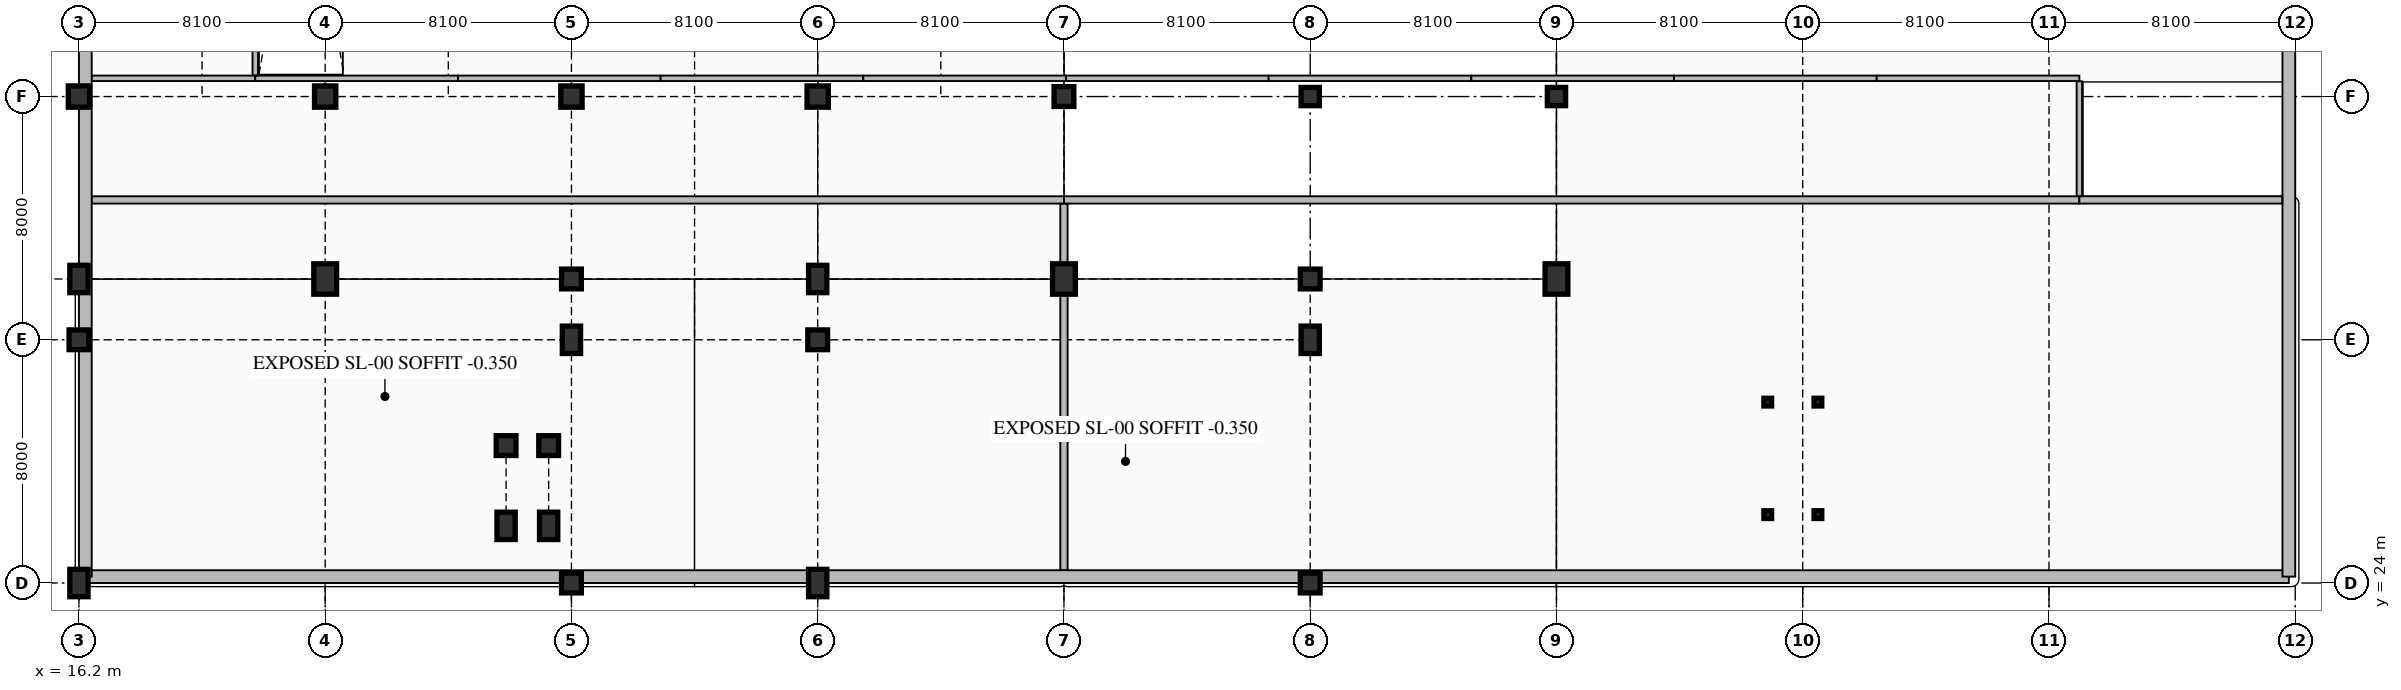
"""IFC4 building model, lengths in metres.
Left out: names, types, materials, properties, quantities, classifications, styles, units other than length and angle.
Written with IfcOpenShell. Run it as: python <this file> out.ifc"""

import sys

from ifc_helpers import new_model, si_unit, direction, frame, frame_2d, origin, origin_2d, place, context, subcontext, project, spatial, rectangle, hollow_rectangle, extrude, element, fill, save


model = new_model("IFC4")
c1 = context("Model", 3, precision=1e-05, world=origin(), true_north=direction((0.0, 1.0)))
c2 = subcontext(c1, "Body", "Model", "MODEL_VIEW")
j1 = project(units=[si_unit("LENGTHUNIT", "METRE"), si_unit("PLANEANGLEUNIT", "RADIAN")], contexts=[c1])
p1 = place(None, origin())
s1 = spatial("IfcSite", under=j1, at=p1, CompositionType="ELEMENT")
p2 = place(p1, origin())
s2 = spatial("IfcBuilding", under=s1, at=p2, CompositionType="ELEMENT")
p3 = place(p2, frame((0.0, 0.0, -4.8)))
s3 = spatial("IfcBuildingStorey", under=s2, at=p3, CompositionType="ELEMENT", Elevation=-4.8)
p4 = place(p3, frame((88.89, 24.21, 0.0), z_axis=(0.0, 0.0, 1.0), x_axis=(-1.0, 0.0, 0.0)))
e1 = element("IfcWall", 1, at=p4, inside=s3, PredefinedType="USERDEFINED", context=c2, shape_type="SweptSolid", body=[
    extrude(rectangle(XDim=72.48, YDim=0.42, at=frame_2d((36.24, 0.0))), origin(), (0.0, 0.0, 1.0), 4.45),
])
p5 = place(p3, frame((16.41, 24.21, 0.0), z_axis=(0.0, 0.0, 1.0), x_axis=(0.0, 1.0, 0.0)))
e2 = element("IfcWall", 2, at=p5, inside=s3, PredefinedType="USERDEFINED", context=c2, shape_type="SweptSolid", body=[
    extrude(rectangle(XDim=87.58, YDim=0.42, at=frame_2d((43.79, 0.0))), origin(), (0.0, 0.0, 1.0), 4.45),
])
p6 = place(p3, frame((88.89, 56.0, 0.0), z_axis=(0.0, 0.0, 1.0), x_axis=(0.0, -1.0, 0.0)))
e3 = element("IfcWall", 3, at=p6, inside=s3, PredefinedType="USERDEFINED", context=c2, shape_type="SweptSolid", body=[
    extrude(rectangle(XDim=31.79, YDim=0.42, at=frame_2d((15.895, 0.0))), origin(), (0.0, 0.0, 1.0), 4.45),
])
p7 = place(p3, frame((16.2, 24.0, 0.0), z_axis=(0.0, 0.0, 1.0), x_axis=(1.0, 0.0, 0.0)))
e4 = element("IfcColumn", 4, at=p7, inside=s3, PredefinedType="COLUMN", context=c2, shape_type="SweptSolid", body=[
    extrude(rectangle(XDim=0.6, YDim=0.9, at=origin_2d()), origin(), (0.0, 0.0, 1.0), 4.8),
])
p8 = place(p3, frame((16.2, 32.0, 0.0), z_axis=(0.0, 0.0, 1.0), x_axis=(1.0, 0.0, 0.0)))
e5 = element("IfcColumn", 5, at=p8, inside=s3, PredefinedType="COLUMN", context=c2, shape_type="SweptSolid", body=[
    extrude(rectangle(XDim=0.65, YDim=0.65, at=origin_2d()), origin(), (0.0, 0.0, 1.0), 4.8),
])
p9 = place(p3, frame((16.2, 34.0, 0.0), z_axis=(0.0, 0.0, 1.0), x_axis=(1.0, 0.0, 0.0)))
e6 = element("IfcColumn", 6, at=p9, inside=s3, PredefinedType="COLUMN", context=c2, shape_type="SweptSolid", body=[
    extrude(rectangle(XDim=0.6, YDim=0.9, at=origin_2d()), origin(), (0.0, 0.0, 1.0), 4.8),
])
p10 = place(p3, frame((16.2, 40.0, 0.0), z_axis=(0.0, 0.0, 1.0), x_axis=(1.0, 0.0, 0.0)))
e7 = element("IfcColumn", 7, at=p10, inside=s3, PredefinedType="COLUMN", context=c2, shape_type="SweptSolid", body=[
    extrude(rectangle(XDim=0.7, YDim=0.7, at=origin_2d()), origin(), (0.0, 0.0, 1.0), 4.8),
])
p11 = place(p3, frame((24.3, 34.0, 0.0), z_axis=(0.0, 0.0, 1.0), x_axis=(1.0, 0.0, 0.0)))
e8 = element("IfcColumn", 8, at=p11, inside=s3, PredefinedType="COLUMN", context=c2, shape_type="SweptSolid", body=[
    extrude(rectangle(XDim=0.75, YDim=1.0, at=origin_2d()), origin(), (0.0, 0.0, 1.0), 4.8),
])
p12 = place(p3, frame((24.3, 40.0, 0.0), z_axis=(0.0, 0.0, 1.0), x_axis=(1.0, 0.0, 0.0)))
e9 = element("IfcColumn", 9, at=p12, inside=s3, PredefinedType="COLUMN", context=c2, shape_type="SweptSolid", body=[
    extrude(rectangle(XDim=0.7, YDim=0.7, at=origin_2d()), origin(), (0.0, 0.0, 1.0), 4.8),
])
p13 = place(p3, frame((30.25, 25.88, 0.0), z_axis=(0.0, 0.0, 1.0), x_axis=(1.0, 0.0, 0.0)))
e10 = element("IfcColumn", 10, at=p13, inside=s3, PredefinedType="COLUMN", context=c2, shape_type="SweptSolid", body=[
    extrude(rectangle(XDim=0.6, YDim=0.9, at=origin_2d()), origin(), (0.0, 0.0, 1.0), 4.8),
])
p14 = place(p3, frame((30.25, 28.52, 0.0), z_axis=(0.0, 0.0, 1.0), x_axis=(1.0, 0.0, 0.0)))
e11 = element("IfcColumn", 11, at=p14, inside=s3, PredefinedType="COLUMN", context=c2, shape_type="SweptSolid", body=[
    extrude(rectangle(XDim=0.65, YDim=0.65, at=origin_2d()), origin(), (0.0, 0.0, 1.0), 4.8),
])
p15 = place(p3, frame((31.65, 25.88, 0.0), z_axis=(0.0, 0.0, 1.0), x_axis=(1.0, 0.0, 0.0)))
e12 = element("IfcColumn", 12, at=p15, inside=s3, PredefinedType="COLUMN", context=c2, shape_type="SweptSolid", body=[
    extrude(rectangle(XDim=0.6, YDim=0.9, at=origin_2d()), origin(), (0.0, 0.0, 1.0), 4.8),
])
for number, where, z_axis, x_axis in (
    (13, (31.65, 28.52, 0.0), (0.0, 0.0, 1.0), (1.0, 0.0, 0.0)),
    (14, (32.4, 24.0, 0.0), (0.0, 0.0, 1.0), (1.0, 0.0, 0.0)),
):
    element("IfcColumn", number, at=place(p3, frame(where, z_axis=z_axis, x_axis=x_axis)), inside=s3, PredefinedType="COLUMN", context=c2, shape_type="SweptSolid", body=[
        extrude(rectangle(XDim=0.65, YDim=0.65, at=origin_2d()), origin(), (0.0, 0.0, 1.0), 4.8),
    ])
p16 = place(p3, frame((32.4, 32.0, 0.0), z_axis=(0.0, 0.0, 1.0), x_axis=(1.0, 0.0, 0.0)))
e15 = element("IfcColumn", 15, at=p16, inside=s3, PredefinedType="COLUMN", context=c2, shape_type="SweptSolid", body=[
    extrude(rectangle(XDim=0.6, YDim=0.9, at=origin_2d()), origin(), (0.0, 0.0, 1.0), 4.8),
])
p17 = place(p3, frame((32.4, 34.0, 0.0), z_axis=(0.0, 0.0, 1.0), x_axis=(1.0, 0.0, 0.0)))
e16 = element("IfcColumn", 16, at=p17, inside=s3, PredefinedType="COLUMN", context=c2, shape_type="SweptSolid", body=[
    extrude(rectangle(XDim=0.65, YDim=0.65, at=origin_2d()), origin(), (0.0, 0.0, 1.0), 4.8),
])
p18 = place(p3, frame((32.4, 40.0, 0.0), z_axis=(0.0, 0.0, 1.0), x_axis=(1.0, 0.0, 0.0)))
e17 = element("IfcColumn", 17, at=p18, inside=s3, PredefinedType="COLUMN", context=c2, shape_type="SweptSolid", body=[
    extrude(rectangle(XDim=0.7, YDim=0.7, at=origin_2d()), origin(), (0.0, 0.0, 1.0), 4.8),
])
p19 = place(p3, frame((40.5, 24.0, 0.0), z_axis=(0.0, 0.0, 1.0), x_axis=(1.0, 0.0, 0.0)))
e18 = element("IfcColumn", 18, at=p19, inside=s3, PredefinedType="COLUMN", context=c2, shape_type="SweptSolid", body=[
    extrude(rectangle(XDim=0.6, YDim=0.9, at=origin_2d()), origin(), (0.0, 0.0, 1.0), 4.8),
])
p20 = place(p3, frame((40.5, 32.0, 0.0), z_axis=(0.0, 0.0, 1.0), x_axis=(1.0, 0.0, 0.0)))
e19 = element("IfcColumn", 19, at=p20, inside=s3, PredefinedType="COLUMN", context=c2, shape_type="SweptSolid", body=[
    extrude(rectangle(XDim=0.65, YDim=0.65, at=origin_2d()), origin(), (0.0, 0.0, 1.0), 4.8),
])
p21 = place(p3, frame((40.5, 34.0, 0.0), z_axis=(0.0, 0.0, 1.0), x_axis=(1.0, 0.0, 0.0)))
e20 = element("IfcColumn", 20, at=p21, inside=s3, PredefinedType="COLUMN", context=c2, shape_type="SweptSolid", body=[
    extrude(rectangle(XDim=0.6, YDim=0.9, at=origin_2d()), origin(), (0.0, 0.0, 1.0), 4.8),
])
p22 = place(p3, frame((40.5, 40.0, 0.0), z_axis=(0.0, 0.0, 1.0), x_axis=(1.0, 0.0, 0.0)))
e21 = element("IfcColumn", 21, at=p22, inside=s3, PredefinedType="COLUMN", context=c2, shape_type="SweptSolid", body=[
    extrude(rectangle(XDim=0.7, YDim=0.7, at=origin_2d()), origin(), (0.0, 0.0, 1.0), 4.8),
])
p23 = place(p3, frame((48.6, 34.0, 0.0), z_axis=(0.0, 0.0, 1.0), x_axis=(1.0, 0.0, 0.0)))
e22 = element("IfcColumn", 22, at=p23, inside=s3, PredefinedType="COLUMN", context=c2, shape_type="SweptSolid", body=[
    extrude(rectangle(XDim=0.75, YDim=1.0, at=origin_2d()), origin(), (0.0, 0.0, 1.0), 4.8),
])
for number, where, z_axis, x_axis in (
    (23, (48.6, 40.0, 0.0), (0.0, 0.0, 1.0), (1.0, 0.0, 0.0)),
    (24, (56.7, 24.0, 0.0), (0.0, 0.0, 1.0), (1.0, 0.0, 0.0)),
):
    element("IfcColumn", number, at=place(p3, frame(where, z_axis=z_axis, x_axis=x_axis)), inside=s3, PredefinedType="COLUMN", context=c2, shape_type="SweptSolid", body=[
        extrude(rectangle(XDim=0.65, YDim=0.65, at=origin_2d()), origin(), (0.0, 0.0, 1.0), 4.8),
    ])
p24 = place(p3, frame((56.7, 32.0, 0.0), z_axis=(0.0, 0.0, 1.0), x_axis=(1.0, 0.0, 0.0)))
e25 = element("IfcColumn", 25, at=p24, inside=s3, PredefinedType="COLUMN", context=c2, shape_type="SweptSolid", body=[
    extrude(rectangle(XDim=0.6, YDim=0.9, at=origin_2d()), origin(), (0.0, 0.0, 1.0), 4.8),
])
p25 = place(p3, frame((56.7, 34.0, 0.0), z_axis=(0.0, 0.0, 1.0), x_axis=(1.0, 0.0, 0.0)))
e26 = element("IfcColumn", 26, at=p25, inside=s3, PredefinedType="COLUMN", context=c2, shape_type="SweptSolid", body=[
    extrude(rectangle(XDim=0.65, YDim=0.65, at=origin_2d()), origin(), (0.0, 0.0, 1.0), 4.8),
])
p26 = place(p3, frame((56.7, 40.0, 0.0), z_axis=(0.0, 0.0, 1.0), x_axis=(1.0, 0.0, 0.0)))
e27 = element("IfcColumn", 27, at=p26, inside=s3, PredefinedType="COLUMN", context=c2, shape_type="SweptSolid", body=[
    extrude(rectangle(XDim=0.6, YDim=0.6, at=origin_2d()), origin(), (0.0, 0.0, 1.0), 4.45),
])
p27 = place(p3, frame((64.8, 34.0, 0.0), z_axis=(0.0, 0.0, 1.0), x_axis=(1.0, 0.0, 0.0)))
e28 = element("IfcColumn", 28, at=p27, inside=s3, PredefinedType="COLUMN", context=c2, shape_type="SweptSolid", body=[
    extrude(rectangle(XDim=0.75, YDim=1.0, at=origin_2d()), origin(), (0.0, 0.0, 1.0), 4.8),
])
p28 = place(p3, frame((64.8, 40.0, 0.0), z_axis=(0.0, 0.0, 1.0), x_axis=(1.0, 0.0, 0.0)))
e29 = element("IfcColumn", 29, at=p28, inside=s3, PredefinedType="COLUMN", context=c2, shape_type="SweptSolid", body=[
    extrude(rectangle(XDim=0.6, YDim=0.6, at=origin_2d()), origin(), (0.0, 0.0, 1.0), 4.8),
])
for number, where, z_axis, x_axis in (
    (30, (73.4, 26.25, 0.0), (0.0, 0.0, 1.0), (1.0, 0.0, 0.0)),
    (31, (73.4, 29.95, 0.0), (0.0, 0.0, 1.0), (1.0, 0.0, 0.0)),
    (32, (71.75, 26.25, 0.0), (0.0, 0.0, 1.0), (1.0, 0.0, 0.0)),
    (33, (71.75, 29.95, 0.0), (0.0, 0.0, 1.0), (1.0, 0.0, 0.0)),
):
    element("IfcColumn", number, at=place(p3, frame(where, z_axis=z_axis, x_axis=x_axis)), inside=s3, PredefinedType="COLUMN", context=c2, shape_type="SweptSolid", body=[
        extrude(hollow_rectangle(XDim=0.254, YDim=0.254, WallThickness=0.013, InnerFilletRadius=0.013, OuterFilletRadius=0.025, at=origin_2d()), origin(), (0.0, 0.0, 1.0), 4.8),
    ])
p29 = place(p3, frame((16.628, 36.6, 0.0), z_axis=(0.0, 0.0, 1.0), x_axis=(1.0, 0.0, 0.0)))
e34 = element("IfcWall", 34, at=p29, inside=s3, PredefinedType="PARTITIONING", context=c2, shape_type="SweptSolid", body=[
    extrude(rectangle(XDim=31.972, YDim=0.24, at=frame_2d((15.986, 0.0))), origin(), (0.0, 0.0, 1.0), 4.45),
])
p30 = place(p29, frame((15.286, 0.0, 0.0)))
e35 = element("IfcOpeningElement", 35, at=p30, cuts=e34, PredefinedType="OPENING", context=c2, shape_type="SweptSolid", body=[
    extrude(rectangle(XDim=1.4, YDim=2.35, at=frame_2d((0.7, 1.175))), frame((0.0, 0.13, 0.0), z_axis=(0.0, -1.0, 0.0), x_axis=(1.0, 0.0, 0.0)), (0.0, 0.0, 1.0), 0.26),
])
p31 = place(p3, frame((16.628, 40.6, 0.0), z_axis=(0.0, 0.0, 1.0), x_axis=(1.0, 0.0, 0.0)))
e36 = element("IfcWall", 36, at=p31, inside=s3, PredefinedType="PARTITIONING", context=c2, shape_type="SweptSolid", body=[
    extrude(rectangle(XDim=5.372, YDim=0.18, at=frame_2d((2.686, 0.0))), origin(), (0.0, 0.0, 1.0), 4.45),
])
p32 = place(p31, frame((2.136, 0.0, 0.0)))
e37 = element("IfcOpeningElement", 37, at=p32, cuts=e36, PredefinedType="OPENING", context=c2, shape_type="SweptSolid", body=[
    extrude(rectangle(XDim=1.1, YDim=2.2, at=frame_2d((0.55, 1.1))), frame((0.0, 0.1, 0.0), z_axis=(0.0, -1.0, 0.0), x_axis=(1.0, 0.0, 0.0)), (0.0, 0.0, 1.0), 0.2),
])
p33 = place(p3, frame((22.0, 40.6, 0.0), z_axis=(0.0, 0.0, 1.0), x_axis=(1.0, 0.0, 0.0)))
e38 = element("IfcWall", 38, at=p33, inside=s3, PredefinedType="PARTITIONING", context=c2, shape_type="SweptSolid", body=[
    extrude(rectangle(XDim=6.667, YDim=0.18, at=frame_2d((3.333, 0.0))), origin(), (0.0, 0.0, 1.0), 4.45),
])
p34 = place(p3, frame((28.667, 40.6, 0.0), z_axis=(0.0, 0.0, 1.0), x_axis=(1.0, 0.0, 0.0)))
e39 = element("IfcWall", 39, at=p34, inside=s3, PredefinedType="PARTITIONING", context=c2, shape_type="SweptSolid", body=[
    extrude(rectangle(XDim=6.667, YDim=0.18, at=frame_2d((3.333, 0.0))), origin(), (0.0, 0.0, 1.0), 4.45),
])
for number, where, z_axis, x_axis in (
    (40, (35.333, 40.6, 0.0), (0.0, 0.0, 1.0), (1.0, 0.0, 0.0)),
    (41, (42.0, 40.6, 0.0), (0.0, 0.0, 1.0), (1.0, 0.0, 0.0)),
):
    element("IfcWall", number, at=place(p3, frame(where, z_axis=z_axis, x_axis=x_axis)), inside=s3, PredefinedType="PARTITIONING", context=c2, shape_type="SweptSolid", body=[
        extrude(rectangle(XDim=6.667, YDim=0.18, at=frame_2d((3.333, 0.0))), origin(), (0.0, 0.0, 1.0), 4.45),
    ])
p35 = place(p3, frame((48.667, 40.6, 0.0), z_axis=(0.0, 0.0, 1.0), x_axis=(1.0, 0.0, 0.0)))
e42 = element("IfcWall", 42, at=p35, inside=s3, PredefinedType="PARTITIONING", context=c2, shape_type="SweptSolid", body=[
    extrude(rectangle(XDim=6.667, YDim=0.18, at=frame_2d((3.333, 0.0))), origin(), (0.0, 0.0, 1.0), 4.45),
])
for number, where, z_axis, x_axis in (
    (43, (55.333, 40.6, 0.0), (0.0, 0.0, 1.0), (1.0, 0.0, 0.0)),
    (44, (62.0, 40.6, 0.0), (0.0, 0.0, 1.0), (1.0, 0.0, 0.0)),
):
    element("IfcWall", number, at=place(p3, frame(where, z_axis=z_axis, x_axis=x_axis)), inside=s3, PredefinedType="PARTITIONING", context=c2, shape_type="SweptSolid", body=[
        extrude(rectangle(XDim=6.667, YDim=0.18, at=frame_2d((3.333, 0.0))), origin(), (0.0, 0.0, 1.0), 4.45),
    ])
p36 = place(p3, frame((68.667, 40.6, 0.0), z_axis=(0.0, 0.0, 1.0), x_axis=(1.0, 0.0, 0.0)))
e45 = element("IfcWall", 45, at=p36, inside=s3, PredefinedType="PARTITIONING", context=c2, shape_type="SweptSolid", body=[
    extrude(rectangle(XDim=6.667, YDim=0.18, at=frame_2d((3.333, 0.0))), origin(), (0.0, 0.0, 1.0), 4.45),
])
p37 = place(p3, frame((75.333, 40.6, 0.0), z_axis=(0.0, 0.0, 1.0), x_axis=(1.0, 0.0, 0.0)))
e46 = element("IfcWall", 46, at=p37, inside=s3, PredefinedType="PARTITIONING", context=c2, shape_type="SweptSolid", body=[
    extrude(rectangle(XDim=6.667, YDim=0.18, at=frame_2d((3.333, 0.0))), origin(), (0.0, 0.0, 1.0), 4.45),
])
p38 = place(p3, frame((48.6, 36.6, 0.0), z_axis=(0.0, 0.0, 1.0), x_axis=(1.0, 0.0, 0.0)))
e47 = element("IfcWall", 47, at=p38, inside=s3, PredefinedType="PARTITIONING", context=c2, shape_type="SweptSolid", body=[
    extrude(rectangle(XDim=33.4, YDim=0.24, at=frame_2d((16.7, 0.0))), origin(), (0.0, 0.0, 1.0), 4.45),
])
p39 = place(p38, frame((16.0, 0.0, 0.0)))
e48 = element("IfcOpeningElement", 48, at=p39, cuts=e47, PredefinedType="OPENING", context=c2, shape_type="SweptSolid", body=[
    extrude(rectangle(XDim=1.4, YDim=2.35, at=frame_2d((0.7, 1.175))), frame((0.0, 0.13, 0.0), z_axis=(0.0, -1.0, 0.0), x_axis=(1.0, 0.0, 0.0)), (0.0, 0.0, 1.0), 0.26),
])
p40 = place(p3, frame((82.0, 36.6, 0.0), z_axis=(0.0, 0.0, 1.0), x_axis=(1.0, 0.0, 0.0)))
e49 = element("IfcWall", 49, at=p40, inside=s3, PredefinedType="PARTITIONING", context=c2, shape_type="SweptSolid", body=[
    extrude(rectangle(XDim=6.672, YDim=0.24, at=frame_2d((3.336, 0.0))), origin(), (0.0, 0.0, 1.0), 4.45),
])
p41 = place(p3, frame((22.0, 40.698, 0.0), z_axis=(0.0, 0.0, 1.0), x_axis=(0.0, 1.0, 0.0)))
e50 = element("IfcWall", 50, at=p41, inside=s3, PredefinedType="PARTITIONING", context=c2, shape_type="SweptSolid", body=[
    extrude(rectangle(XDim=5.325, YDim=0.18, at=frame_2d((2.662, 0.0))), origin(), (0.0, 0.0, 1.0), 4.45),
])
p42 = place(p3, frame((48.6, 24.428, 0.0), z_axis=(0.0, 0.0, 1.0), x_axis=(0.0, 1.0, 0.0)))
e51 = element("IfcWall", 51, at=p42, inside=s3, PredefinedType="PARTITIONING", context=c2, shape_type="SweptSolid", body=[
    extrude(rectangle(XDim=9.064, YDim=0.24, at=frame_2d((4.532, 0.0))), origin(), (0.0, 0.0, 1.0), 3.242),
])
p43 = place(p3, frame((48.6, 34.508, 0.0), z_axis=(0.0, 0.0, 1.0), x_axis=(0.0, 1.0, 0.0)))
e52 = element("IfcWall", 52, at=p43, inside=s3, PredefinedType="PARTITIONING", context=c2, shape_type="SweptSolid", body=[
    extrude(rectangle(XDim=1.964, YDim=0.24, at=frame_2d((0.982, 0.0))), origin(), (0.0, 0.0, 1.0), 3.692),
])
p44 = place(p3, frame((82.0, 36.728, 0.0), z_axis=(0.0, 0.0, 1.0), x_axis=(0.0, 1.0, 0.0)))
e53 = element("IfcWall", 53, at=p44, inside=s3, PredefinedType="PARTITIONING", context=c2, shape_type="SweptSolid", body=[
    extrude(rectangle(XDim=3.774, YDim=0.18, at=frame_2d((1.887, 0.0))), origin(), (0.0, 0.0, 1.0), 4.45),
])
p45 = place(p30, frame((1.4, 0.0, 0.0), z_axis=(0.0, 0.0, 1.0), x_axis=(-1.0, 0.0, 0.0)))
e54 = element("IfcDoor", 54, at=p45, inside=s3, OperationType="DOUBLE_DOOR_SINGLE_SWING", PredefinedType="DOOR", context=c2, shape_type="SweptSolid", body=[
    extrude(rectangle(XDim=1.4, YDim=2.35, at=frame_2d((0.7, 1.175))), frame((0.0, 0.025, 0.0), z_axis=(0.0, -1.0, 0.0), x_axis=(1.0, 0.0, 0.0)), (0.0, 0.0, 1.0), 0.05),
])
fill(e35, e54)
p46 = place(p32, origin())
e55 = element("IfcDoor", 55, at=p46, inside=s3, OperationType="SINGLE_SWING_RIGHT", PredefinedType="DOOR", context=c2, shape_type="SweptSolid", body=[
    extrude(rectangle(XDim=1.1, YDim=2.2, at=frame_2d((0.55, 1.1))), frame((0.0, 0.025, 0.0), z_axis=(0.0, -1.0, 0.0), x_axis=(1.0, 0.0, 0.0)), (0.0, 0.0, 1.0), 0.05),
])
fill(e37, e55)
p47 = place(p39, frame((1.4, 0.0, 0.0), z_axis=(0.0, 0.0, 1.0), x_axis=(-1.0, 0.0, 0.0)))
e56 = element("IfcDoor", 56, at=p47, inside=s3, OperationType="DOUBLE_DOOR_SINGLE_SWING", PredefinedType="DOOR", context=c2, shape_type="SweptSolid", body=[
    extrude(rectangle(XDim=1.4, YDim=2.35, at=frame_2d((0.7, 1.175))), frame((0.0, 0.025, 0.0), z_axis=(0.0, -1.0, 0.0), x_axis=(1.0, 0.0, 0.0)), (0.0, 0.0, 1.0), 0.05),
])
fill(e48, e56)
save(model, sys.argv[1])
